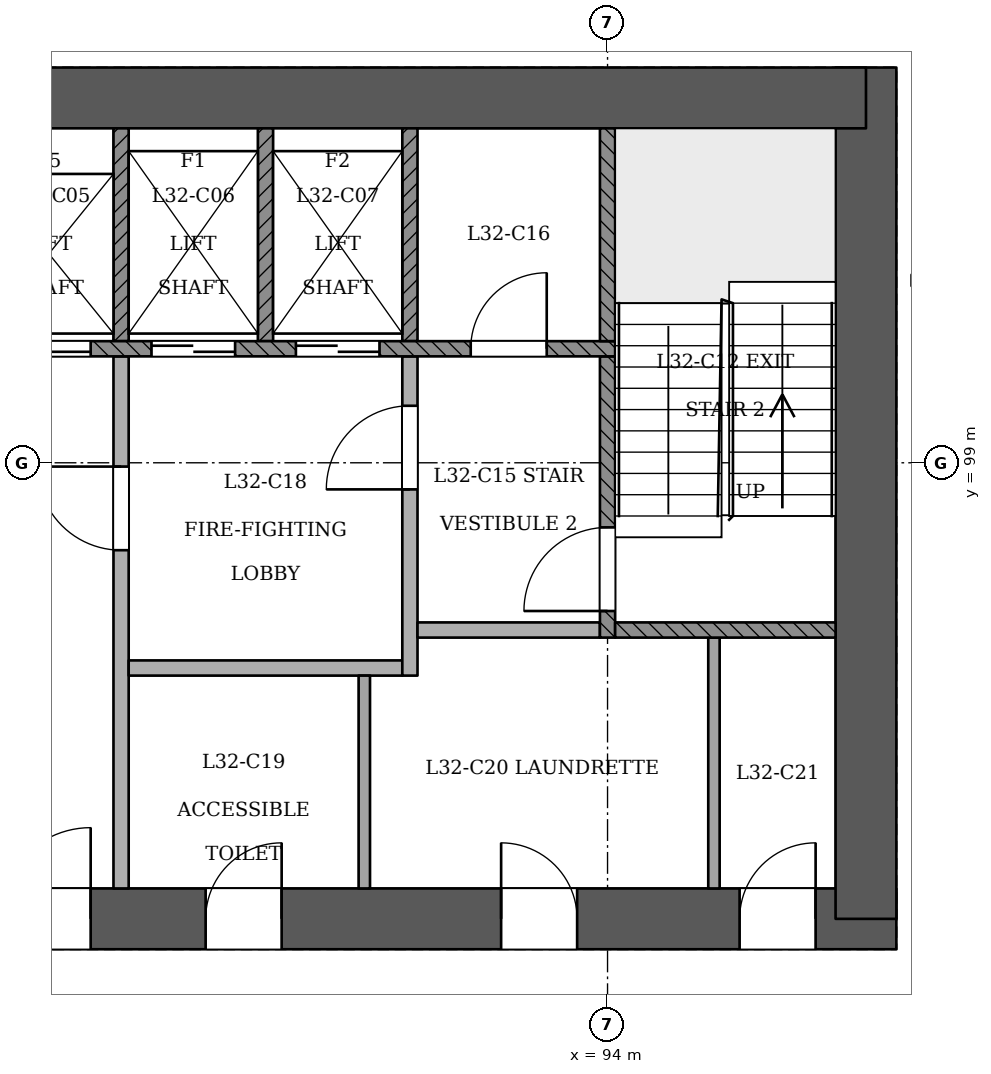
"""IFC4 building model, lengths in metres.
Left out: names, types, materials, properties, quantities, classifications, styles, units other than length and angle.
Written with IfcOpenShell. Run it as: python <this file> out.ifc"""

import sys

from ifc_helpers import new_model, si_unit, direction, frame, frame_2d, origin, place, context, subcontext, project, spatial, rectangle, extrude, element, fill, save


model = new_model("IFC4")
c1 = context("Model", 3, precision=1e-05, world=origin(), true_north=direction((0.0, 1.0)))
c2 = subcontext(c1, "Body", "Model", "MODEL_VIEW")
j1 = project(units=[si_unit("LENGTHUNIT", "METRE"), si_unit("PLANEANGLEUNIT", "RADIAN")], contexts=[c1])
p1 = place(None, origin())
s1 = spatial("IfcSite", under=j1, at=p1, CompositionType="ELEMENT")
p2 = place(p1, origin())
s2 = spatial("IfcBuilding", under=s1, at=p2, CompositionType="ELEMENT")
p3 = place(p2, frame((0.0, 0.0, 127.8)))
s3 = spatial("IfcBuildingStorey", under=s2, at=p3, CompositionType="ELEMENT", Elevation=127.8)
p4 = place(p3, frame((72.6, 93.0, 0.0), z_axis=(0.0, 0.0, 1.0), x_axis=(1.0, 0.0, 0.0)))
e1 = element("IfcWall", 1, at=p4, inside=s3, PredefinedType="SHEAR", context=c2, shape_type="SweptSolid", body=[
    extrude(rectangle(XDim=25.2, YDim=0.8, at=frame_2d((12.6, 0.0))), origin(), (0.0, 0.0, 1.0), 3.6),
])
p5 = place(p4, frame((1.2, 0.0, 0.0)))
e2 = element("IfcOpeningElement", 2, at=p5, cuts=e1, PredefinedType="OPENING", context=c2, shape_type="SweptSolid", body=[
    extrude(rectangle(XDim=1.2, YDim=2.1, at=frame_2d((0.6, 1.05))), frame((0.0, 0.411, 0.0), z_axis=(0.0, -1.0, 0.0), x_axis=(1.0, 0.0, 0.0)), (0.0, 0.0, 1.0), 0.821),
])
p6 = place(p4, frame((3.4, 0.0, 0.0)))
e3 = element("IfcOpeningElement", 3, at=p6, cuts=e1, PredefinedType="OPENING", context=c2, shape_type="SweptSolid", body=[
    extrude(rectangle(XDim=1.2, YDim=2.1, at=frame_2d((0.6, 1.05))), frame((0.0, 0.411, 0.0), z_axis=(0.0, -1.0, 0.0), x_axis=(1.0, 0.0, 0.0)), (0.0, 0.0, 1.0), 0.821),
])
p7 = place(p4, frame((13.4, 0.0, 0.0)))
e4 = element("IfcOpeningElement", 4, at=p7, cuts=e1, PredefinedType="OPENING", context=c2, shape_type="SweptSolid", body=[
    extrude(rectangle(XDim=1.2, YDim=2.1, at=frame_2d((0.6, 1.05))), frame((0.0, 0.411, 0.0), z_axis=(0.0, -1.0, 0.0), x_axis=(1.0, 0.0, 0.0)), (0.0, 0.0, 1.0), 0.821),
])
p8 = place(p4, frame((16.113, 0.0, 0.0)))
e5 = element("IfcOpeningElement", 5, at=p8, cuts=e1, PredefinedType="OPENING", context=c2, shape_type="SweptSolid", body=[
    extrude(rectangle(XDim=1.0, YDim=2.1, at=frame_2d((0.5, 1.05))), frame((0.0, 0.411, 0.0), z_axis=(0.0, -1.0, 0.0), x_axis=(1.0, 0.0, 0.0)), (0.0, 0.0, 1.0), 0.821),
])
p9 = place(p4, frame((20.0, 0.0, 0.0)))
e6 = element("IfcOpeningElement", 6, at=p9, cuts=e1, PredefinedType="OPENING", context=c2, shape_type="SweptSolid", body=[
    extrude(rectangle(XDim=1.0, YDim=2.1, at=frame_2d((0.5, 1.05))), frame((0.0, 0.411, 0.0), z_axis=(0.0, -1.0, 0.0), x_axis=(1.0, 0.0, 0.0)), (0.0, 0.0, 1.0), 0.821),
])
p10 = place(p4, frame((23.137, 0.0, 0.0)))
e7 = element("IfcOpeningElement", 7, at=p10, cuts=e1, PredefinedType="OPENING", context=c2, shape_type="SweptSolid", body=[
    extrude(rectangle(XDim=1.0, YDim=2.1, at=frame_2d((0.5, 1.05))), frame((0.0, 0.411, 0.0), z_axis=(0.0, -1.0, 0.0), x_axis=(1.0, 0.0, 0.0)), (0.0, 0.0, 1.0), 0.821),
])
p11 = place(p3, frame((97.4, 93.0, 0.0), z_axis=(0.0, 0.0, 1.0), x_axis=(0.0, 1.0, 0.0)))
e8 = element("IfcWall", 8, at=p11, inside=s3, PredefinedType="SHEAR", context=c2, shape_type="SweptSolid", body=[
    extrude(rectangle(XDim=11.2, YDim=0.8, at=frame_2d((5.6, 0.0))), origin(), (0.0, 0.0, 1.0), 3.6),
])
p12 = place(p3, frame((97.4, 103.8, 0.0), z_axis=(0.0, 0.0, 1.0), x_axis=(-1.0, 0.0, 0.0)))
e9 = element("IfcWall", 9, at=p12, inside=s3, PredefinedType="SHEAR", context=c2, shape_type="SweptSolid", body=[
    extrude(rectangle(XDim=25.2, YDim=0.8, at=frame_2d((12.6, 0.0))), origin(), (0.0, 0.0, 1.0), 3.6),
])
p13 = place(p3, frame((85.17, 63.052, 0.0), z_axis=(0.0, 0.0, 1.0), x_axis=(0.499999603446, 0.866025632735, 0.0)))
e10 = element("IfcWall", 10, at=p13, inside=s3, PredefinedType="PARTITIONING", context=c2, shape_type="SweptSolid", body=[
    extrude(rectangle(XDim=40.592, YDim=0.15, at=frame_2d((20.296, 0.0))), origin(), (0.0, 0.0, 1.0), 2.75),
])
p14 = place(p13, frame((0.273, 0.0, 0.0)))
e11 = element("IfcOpeningElement", 11, at=p14, cuts=e10, PredefinedType="OPENING", context=c2, shape_type="SweptSolid", body=[
    extrude(rectangle(XDim=1.2, YDim=2.1, at=frame_2d((0.6, 1.05))), frame((0.0, 0.085, 0.0), z_axis=(0.0, -1.0, 0.0), x_axis=(1.0, 0.0, 0.0)), (0.0, 0.0, 1.0), 0.171),
])
p15 = place(p13, frame((4.046, 0.0, 0.0)))
e12 = element("IfcOpeningElement", 12, at=p15, cuts=e10, PredefinedType="OPENING", context=c2, shape_type="SweptSolid", body=[
    extrude(rectangle(XDim=1.0, YDim=2.1, at=frame_2d((0.5, 1.05))), frame((0.0, 0.085, 0.0), z_axis=(0.0, -1.0, 0.0), x_axis=(1.0, 0.0, 0.0)), (0.0, 0.0, 1.0), 0.171),
])
p16 = place(p13, frame((9.576, 0.0, 0.0)))
e13 = element("IfcOpeningElement", 13, at=p16, cuts=e10, PredefinedType="OPENING", context=c2, shape_type="SweptSolid", body=[
    extrude(rectangle(XDim=1.0, YDim=2.1, at=frame_2d((0.5, 1.05))), frame((0.0, 0.085, 0.0), z_axis=(0.0, -1.0, 0.0), x_axis=(1.0, 0.0, 0.0)), (0.0, 0.0, 1.0), 0.171),
])
p17 = place(p13, frame((11.901, 0.0, 0.0)))
e14 = element("IfcOpeningElement", 14, at=p17, cuts=e10, PredefinedType="OPENING", context=c2, shape_type="SweptSolid", body=[
    extrude(rectangle(XDim=1.0, YDim=2.1, at=frame_2d((0.5, 1.05))), frame((0.0, 0.085, 0.0), z_axis=(0.0, -1.0, 0.0), x_axis=(1.0, 0.0, 0.0)), (0.0, 0.0, 1.0), 0.171),
])
p18 = place(p13, frame((18.691, 0.0, 0.0)))
e15 = element("IfcOpeningElement", 15, at=p18, cuts=e10, PredefinedType="OPENING", context=c2, shape_type="SweptSolid", body=[
    extrude(rectangle(XDim=1.0, YDim=2.1, at=frame_2d((0.5, 1.05))), frame((0.0, 0.085, 0.0), z_axis=(0.0, -1.0, 0.0), x_axis=(1.0, 0.0, 0.0)), (0.0, 0.0, 1.0), 0.171),
])
p19 = place(p13, frame((21.016, 0.0, 0.0)))
e16 = element("IfcOpeningElement", 16, at=p19, cuts=e10, PredefinedType="OPENING", context=c2, shape_type="SweptSolid", body=[
    extrude(rectangle(XDim=1.0, YDim=2.1, at=frame_2d((0.5, 1.05))), frame((0.0, 0.085, 0.0), z_axis=(0.0, -1.0, 0.0), x_axis=(1.0, 0.0, 0.0)), (0.0, 0.0, 1.0), 0.171),
])
p20 = place(p13, frame((27.576, 0.0, 0.0)))
e17 = element("IfcOpeningElement", 17, at=p20, cuts=e10, PredefinedType="OPENING", context=c2, shape_type="SweptSolid", body=[
    extrude(rectangle(XDim=1.0, YDim=2.1, at=frame_2d((0.5, 1.05))), frame((0.0, 0.085, 0.0), z_axis=(0.0, -1.0, 0.0), x_axis=(1.0, 0.0, 0.0)), (0.0, 0.0, 1.0), 0.171),
])
p21 = place(p13, frame((30.016, 0.0, 0.0)))
e18 = element("IfcOpeningElement", 18, at=p21, cuts=e10, PredefinedType="OPENING", context=c2, shape_type="SweptSolid", body=[
    extrude(rectangle(XDim=1.0, YDim=2.1, at=frame_2d((0.5, 1.05))), frame((0.0, 0.085, 0.0), z_axis=(0.0, -1.0, 0.0), x_axis=(1.0, 0.0, 0.0)), (0.0, 0.0, 1.0), 0.171),
])
p22 = place(p13, frame((39.192, 0.0, 0.0)))
e19 = element("IfcOpeningElement", 19, at=p22, cuts=e10, PredefinedType="OPENING", context=c2, shape_type="SweptSolid", body=[
    extrude(rectangle(XDim=1.2, YDim=2.1, at=frame_2d((0.6, 1.05))), frame((0.0, 0.085, 0.0), z_axis=(0.0, -1.0, 0.0), x_axis=(1.0, 0.0, 0.0)), (0.0, 0.0, 1.0), 0.171),
])
p23 = place(p3, frame((87.6, 93.4, 0.0), z_axis=(0.0, 0.0, 1.0), x_axis=(0.0, 1.0, 0.0)))
e20 = element("IfcWall", 20, at=p23, inside=s3, PredefinedType="PARTITIONING", context=c2, shape_type="SweptSolid", body=[
    extrude(rectangle(XDim=7.0, YDim=0.2, at=frame_2d((3.5, 0.0))), origin(), (0.0, 0.0, 1.0), 3.15),
])
p24 = place(p23, frame((4.45, 0.0, 0.0)))
e21 = element("IfcOpeningElement", 21, at=p24, cuts=e20, PredefinedType="OPENING", context=c2, shape_type="SweptSolid", body=[
    extrude(rectangle(XDim=1.1, YDim=2.1, at=frame_2d((0.55, 1.05))), frame((0.0, 0.11, 0.0), z_axis=(0.0, -1.0, 0.0), x_axis=(1.0, 0.0, 0.0)), (0.0, 0.0, 1.0), 0.221),
])
p25 = place(p3, frame((90.8, 93.4, 0.0), z_axis=(0.0, 0.0, 1.0), x_axis=(0.0, 1.0, 0.0)))
e22 = element("IfcWall", 22, at=p25, inside=s3, PredefinedType="PARTITIONING", context=c2, shape_type="SweptSolid", body=[
    extrude(rectangle(XDim=2.8, YDim=0.15, at=frame_2d((1.4, 0.0))), origin(), (0.0, 0.0, 1.0), 3.15),
])
p26 = place(p3, frame((95.4, 93.4, 0.0), z_axis=(0.0, 0.0, 1.0), x_axis=(0.0, 1.0, 0.0)))
e23 = element("IfcWall", 23, at=p26, inside=s3, PredefinedType="PARTITIONING", context=c2, shape_type="SweptSolid", body=[
    extrude(rectangle(XDim=3.3, YDim=0.15, at=frame_2d((1.65, 0.0))), origin(), (0.0, 0.0, 1.0), 3.15),
])
p27 = place(p3, frame((87.7, 96.3, 0.0), z_axis=(0.0, 0.0, 1.0), x_axis=(1.0, 0.0, 0.0)))
e24 = element("IfcWall", 24, at=p27, inside=s3, PredefinedType="PARTITIONING", context=c2, shape_type="SweptSolid", body=[
    extrude(rectangle(XDim=3.6, YDim=0.2, at=frame_2d((1.8, 0.0))), origin(), (0.0, 0.0, 1.0), 3.15),
])
p28 = place(p3, frame((91.4, 96.2, 0.0), z_axis=(0.0, 0.0, 1.0), x_axis=(0.0, 1.0, 0.0)))
e25 = element("IfcWall", 25, at=p28, inside=s3, PredefinedType="PARTITIONING", context=c2, shape_type="SweptSolid", body=[
    extrude(rectangle(XDim=4.2, YDim=0.2, at=frame_2d((2.1, 0.0))), origin(), (0.0, 0.0, 1.0), 3.15),
])
p29 = place(p28, frame((2.45, 0.0, 0.0)))
e26 = element("IfcOpeningElement", 26, at=p29, cuts=e25, PredefinedType="OPENING", context=c2, shape_type="SweptSolid", body=[
    extrude(rectangle(XDim=1.1, YDim=2.1, at=frame_2d((0.55, 1.05))), frame((0.0, 0.11, 0.0), z_axis=(0.0, -1.0, 0.0), x_axis=(1.0, 0.0, 0.0)), (0.0, 0.0, 1.0), 0.221),
])
p30 = place(p3, frame((91.5, 96.8, 0.0), z_axis=(0.0, 0.0, 1.0), x_axis=(1.0, 0.0, 0.0)))
e27 = element("IfcWall", 27, at=p30, inside=s3, PredefinedType="PARTITIONING", context=c2, shape_type="SweptSolid", body=[
    extrude(rectangle(XDim=2.4, YDim=0.2, at=frame_2d((1.2, 0.0))), origin(), (0.0, 0.0, 1.0), 3.15),
])
p31 = place(p3, frame((94.0, 96.7, 0.0), z_axis=(0.0, 0.0, 1.0), x_axis=(0.0, 1.0, 0.0)))
e28 = element("IfcWall", 28, at=p31, inside=s3, PredefinedType="SOLIDWALL", context=c2, shape_type="SweptSolid", body=[
    extrude(rectangle(XDim=3.7, YDim=0.2, at=frame_2d((1.85, 0.0))), origin(), (0.0, 0.0, 1.0), 3.15),
])
p32 = place(p31, frame((0.35, 0.0, 0.0)))
e29 = element("IfcOpeningElement", 29, at=p32, cuts=e28, PredefinedType="OPENING", context=c2, shape_type="SweptSolid", body=[
    extrude(rectangle(XDim=1.1, YDim=2.1, at=frame_2d((0.55, 1.05))), frame((0.0, 0.11, 0.0), z_axis=(0.0, -1.0, 0.0), x_axis=(1.0, 0.0, 0.0)), (0.0, 0.0, 1.0), 0.221),
])
p33 = place(p3, frame((94.1, 96.8, 0.0), z_axis=(0.0, 0.0, 1.0), x_axis=(1.0, 0.0, 0.0)))
e30 = element("IfcWall", 30, at=p33, inside=s3, PredefinedType="SOLIDWALL", context=c2, shape_type="SweptSolid", body=[
    extrude(rectangle(XDim=2.9, YDim=0.2, at=frame_2d((1.45, 0.0))), origin(), (0.0, 0.0, 1.0), 3.15),
])
p34 = place(p3, frame((75.9, 100.5, 0.0), z_axis=(0.0, 0.0, 1.0), x_axis=(1.0, 0.0, 0.0)))
e31 = element("IfcWall", 31, at=p34, inside=s3, PredefinedType="SOLIDWALL", context=c2, shape_type="SweptSolid", body=[
    extrude(rectangle(XDim=18.2, YDim=0.2, at=frame_2d((9.1, 0.0))), origin(), (0.0, 0.0, 1.0), 3.15),
])
p35 = place(p34, frame((2.6, 0.0, 0.0)))
e32 = element("IfcOpeningElement", 32, at=p35, cuts=e31, PredefinedType="OPENING", context=c2, shape_type="SweptSolid", body=[
    extrude(rectangle(XDim=1.1, YDim=2.1, at=frame_2d((0.55, 1.05))), frame((0.0, 0.11, 0.0), z_axis=(0.0, -1.0, 0.0), x_axis=(1.0, 0.0, 0.0)), (0.0, 0.0, 1.0), 0.221),
])
p36 = place(p34, frame((4.5, 0.0, 0.0)))
e33 = element("IfcOpeningElement", 33, at=p36, cuts=e31, PredefinedType="OPENING", context=c2, shape_type="SweptSolid", body=[
    extrude(rectangle(XDim=1.1, YDim=2.1, at=frame_2d((0.55, 1.05))), frame((0.0, 0.11, 0.0), z_axis=(0.0, -1.0, 0.0), x_axis=(1.0, 0.0, 0.0)), (0.0, 0.0, 1.0), 0.221),
])
p37 = place(p34, frame((6.4, 0.0, 0.0)))
e34 = element("IfcOpeningElement", 34, at=p37, cuts=e31, PredefinedType="OPENING", context=c2, shape_type="SweptSolid", body=[
    extrude(rectangle(XDim=1.1, YDim=2.1, at=frame_2d((0.55, 1.05))), frame((0.0, 0.11, 0.0), z_axis=(0.0, -1.0, 0.0), x_axis=(1.0, 0.0, 0.0)), (0.0, 0.0, 1.0), 0.221),
])
p38 = place(p34, frame((8.3, 0.0, 0.0)))
e35 = element("IfcOpeningElement", 35, at=p38, cuts=e31, PredefinedType="OPENING", context=c2, shape_type="SweptSolid", body=[
    extrude(rectangle(XDim=1.1, YDim=2.1, at=frame_2d((0.55, 1.05))), frame((0.0, 0.11, 0.0), z_axis=(0.0, -1.0, 0.0), x_axis=(1.0, 0.0, 0.0)), (0.0, 0.0, 1.0), 0.221),
])
p39 = place(p34, frame((10.2, 0.0, 0.0)))
e36 = element("IfcOpeningElement", 36, at=p39, cuts=e31, PredefinedType="OPENING", context=c2, shape_type="SweptSolid", body=[
    extrude(rectangle(XDim=1.1, YDim=2.1, at=frame_2d((0.55, 1.05))), frame((0.0, 0.11, 0.0), z_axis=(0.0, -1.0, 0.0), x_axis=(1.0, 0.0, 0.0)), (0.0, 0.0, 1.0), 0.221),
])
p40 = place(p34, frame((12.1, 0.0, 0.0)))
e37 = element("IfcOpeningElement", 37, at=p40, cuts=e31, PredefinedType="OPENING", context=c2, shape_type="SweptSolid", body=[
    extrude(rectangle(XDim=1.1, YDim=2.1, at=frame_2d((0.55, 1.05))), frame((0.0, 0.11, 0.0), z_axis=(0.0, -1.0, 0.0), x_axis=(1.0, 0.0, 0.0)), (0.0, 0.0, 1.0), 0.221),
])
p41 = place(p34, frame((14.0, 0.0, 0.0)))
e38 = element("IfcOpeningElement", 38, at=p41, cuts=e31, PredefinedType="OPENING", context=c2, shape_type="SweptSolid", body=[
    extrude(rectangle(XDim=1.1, YDim=2.1, at=frame_2d((0.55, 1.05))), frame((0.0, 0.11, 0.0), z_axis=(0.0, -1.0, 0.0), x_axis=(1.0, 0.0, 0.0)), (0.0, 0.0, 1.0), 0.221),
])
p42 = place(p34, frame((0.65, 0.0, 0.0)))
e39 = element("IfcOpeningElement", 39, at=p42, cuts=e31, PredefinedType="OPENING", context=c2, shape_type="SweptSolid", body=[
    extrude(rectangle(XDim=1.0, YDim=2.1, at=frame_2d((0.5, 1.05))), frame((0.0, 0.11, 0.0), z_axis=(0.0, -1.0, 0.0), x_axis=(1.0, 0.0, 0.0)), (0.0, 0.0, 1.0), 0.221),
])
p43 = place(p34, frame((16.3, 0.0, 0.0)))
e40 = element("IfcOpeningElement", 40, at=p43, cuts=e31, PredefinedType="OPENING", context=c2, shape_type="SweptSolid", body=[
    extrude(rectangle(XDim=1.0, YDim=2.1, at=frame_2d((0.5, 1.05))), frame((0.0, 0.11, 0.0), z_axis=(0.0, -1.0, 0.0), x_axis=(1.0, 0.0, 0.0)), (0.0, 0.0, 1.0), 0.221),
])
for number, where, z_axis, x_axis in (
    (41, (87.6, 100.6, 0.0), (0.0, 0.0, 1.0), (0.0, 1.0, 0.0)),
    (42, (89.5, 100.6, 0.0), (0.0, 0.0, 1.0), (0.0, 1.0, 0.0)),
    (43, (91.4, 100.6, 0.0), (0.0, 0.0, 1.0), (0.0, 1.0, 0.0)),
    (44, (94.0, 100.6, 0.0), (0.0, 0.0, 1.0), (0.0, 1.0, 0.0)),
):
    element("IfcWall", number, at=place(p3, frame(where, z_axis=z_axis, x_axis=x_axis)), inside=s3, PredefinedType="SOLIDWALL", context=c2, shape_type="SweptSolid", body=[
        extrude(rectangle(XDim=2.8, YDim=0.2, at=frame_2d((1.4, 0.0))), origin(), (0.0, 0.0, 1.0), 3.15),
    ])
p44 = place(p39, origin())
e45 = element("IfcDoor", 45, at=p44, inside=s3, OperationType="SLIDING_TO_RIGHT", PredefinedType="NOTDEFINED", context=c2, shape_type="SweptSolid", body=[
    extrude(rectangle(XDim=1.1, YDim=2.1, at=frame_2d((0.55, 1.05))), frame((0.0, 0.025, 0.0), z_axis=(0.0, -1.0, 0.0), x_axis=(1.0, 0.0, 0.0)), (0.0, 0.0, 1.0), 0.05),
])
fill(e36, e45)
p45 = place(p40, origin())
e46 = element("IfcDoor", 46, at=p45, inside=s3, OperationType="SLIDING_TO_RIGHT", PredefinedType="NOTDEFINED", context=c2, shape_type="SweptSolid", body=[
    extrude(rectangle(XDim=1.1, YDim=2.1, at=frame_2d((0.55, 1.05))), frame((0.0, 0.025, 0.0), z_axis=(0.0, -1.0, 0.0), x_axis=(1.0, 0.0, 0.0)), (0.0, 0.0, 1.0), 0.05),
])
fill(e37, e46)
p46 = place(p41, origin())
e47 = element("IfcDoor", 47, at=p46, inside=s3, OperationType="SLIDING_TO_LEFT", PredefinedType="NOTDEFINED", context=c2, shape_type="SweptSolid", body=[
    extrude(rectangle(XDim=1.1, YDim=2.1, at=frame_2d((0.55, 1.05))), frame((0.0, 0.025, 0.0), z_axis=(0.0, -1.0, 0.0), x_axis=(1.0, 0.0, 0.0)), (0.0, 0.0, 1.0), 0.05),
])
fill(e38, e47)
p47 = place(p32, origin())
e48 = element("IfcDoor", 48, at=p47, inside=s3, OperationType="SINGLE_SWING_LEFT", PredefinedType="NOTDEFINED", context=c2, shape_type="SweptSolid", body=[
    extrude(rectangle(XDim=1.1, YDim=2.1, at=frame_2d((0.55, 1.05))), frame((0.0, 0.025, 0.0), z_axis=(0.0, -1.0, 0.0), x_axis=(1.0, 0.0, 0.0)), (0.0, 0.0, 1.0), 0.05),
])
fill(e29, e48)
p48 = place(p24, origin())
e49 = element("IfcDoor", 49, at=p48, inside=s3, OperationType="SINGLE_SWING_RIGHT", PredefinedType="NOTDEFINED", context=c2, shape_type="SweptSolid", body=[
    extrude(rectangle(XDim=1.1, YDim=2.1, at=frame_2d((0.55, 1.05))), frame((0.0, 0.025, 0.0), z_axis=(0.0, -1.0, 0.0), x_axis=(1.0, 0.0, 0.0)), (0.0, 0.0, 1.0), 0.05),
])
fill(e21, e49)
p49 = place(p29, origin())
e50 = element("IfcDoor", 50, at=p49, inside=s3, OperationType="SINGLE_SWING_LEFT", PredefinedType="NOTDEFINED", context=c2, shape_type="SweptSolid", body=[
    extrude(rectangle(XDim=1.1, YDim=2.1, at=frame_2d((0.55, 1.05))), frame((0.0, 0.025, 0.0), z_axis=(0.0, -1.0, 0.0), x_axis=(1.0, 0.0, 0.0)), (0.0, 0.0, 1.0), 0.05),
])
fill(e26, e50)
p50 = place(p7, origin())
e51 = element("IfcDoor", 51, at=p50, inside=s3, OperationType="SINGLE_SWING_RIGHT", PredefinedType="NOTDEFINED", context=c2, shape_type="SweptSolid", body=[
    extrude(rectangle(XDim=1.2, YDim=2.1, at=frame_2d((0.6, 1.05))), frame((0.0, 0.025, 0.0), z_axis=(0.0, -1.0, 0.0), x_axis=(1.0, 0.0, 0.0)), (0.0, 0.0, 1.0), 0.05),
])
fill(e4, e51)
p51 = place(p43, origin())
e52 = element("IfcDoor", 52, at=p51, inside=s3, OperationType="SINGLE_SWING_RIGHT", PredefinedType="NOTDEFINED", context=c2, shape_type="SweptSolid", body=[
    extrude(rectangle(XDim=1.0, YDim=2.1, at=frame_2d((0.5, 1.05))), frame((0.0, 0.025, 0.0), z_axis=(0.0, -1.0, 0.0), x_axis=(1.0, 0.0, 0.0)), (0.0, 0.0, 1.0), 0.05),
])
fill(e40, e52)
p52 = place(p8, origin())
e53 = element("IfcDoor", 53, at=p52, inside=s3, OperationType="SINGLE_SWING_RIGHT", PredefinedType="NOTDEFINED", context=c2, shape_type="SweptSolid", body=[
    extrude(rectangle(XDim=1.0, YDim=2.1, at=frame_2d((0.5, 1.05))), frame((0.0, 0.025, 0.0), z_axis=(0.0, -1.0, 0.0), x_axis=(1.0, 0.0, 0.0)), (0.0, 0.0, 1.0), 0.05),
])
fill(e5, e53)
p53 = place(p9, origin())
e54 = element("IfcDoor", 54, at=p53, inside=s3, OperationType="SINGLE_SWING_LEFT", PredefinedType="NOTDEFINED", context=c2, shape_type="SweptSolid", body=[
    extrude(rectangle(XDim=1.0, YDim=2.1, at=frame_2d((0.5, 1.05))), frame((0.0, 0.025, 0.0), z_axis=(0.0, -1.0, 0.0), x_axis=(1.0, 0.0, 0.0)), (0.0, 0.0, 1.0), 0.05),
])
fill(e6, e54)
p54 = place(p10, origin())
e55 = element("IfcDoor", 55, at=p54, inside=s3, OperationType="SINGLE_SWING_RIGHT", PredefinedType="NOTDEFINED", context=c2, shape_type="SweptSolid", body=[
    extrude(rectangle(XDim=1.0, YDim=2.1, at=frame_2d((0.5, 1.05))), frame((0.0, 0.025, 0.0), z_axis=(0.0, -1.0, 0.0), x_axis=(1.0, 0.0, 0.0)), (0.0, 0.0, 1.0), 0.05),
])
fill(e7, e55)
save(model, sys.argv[1])
